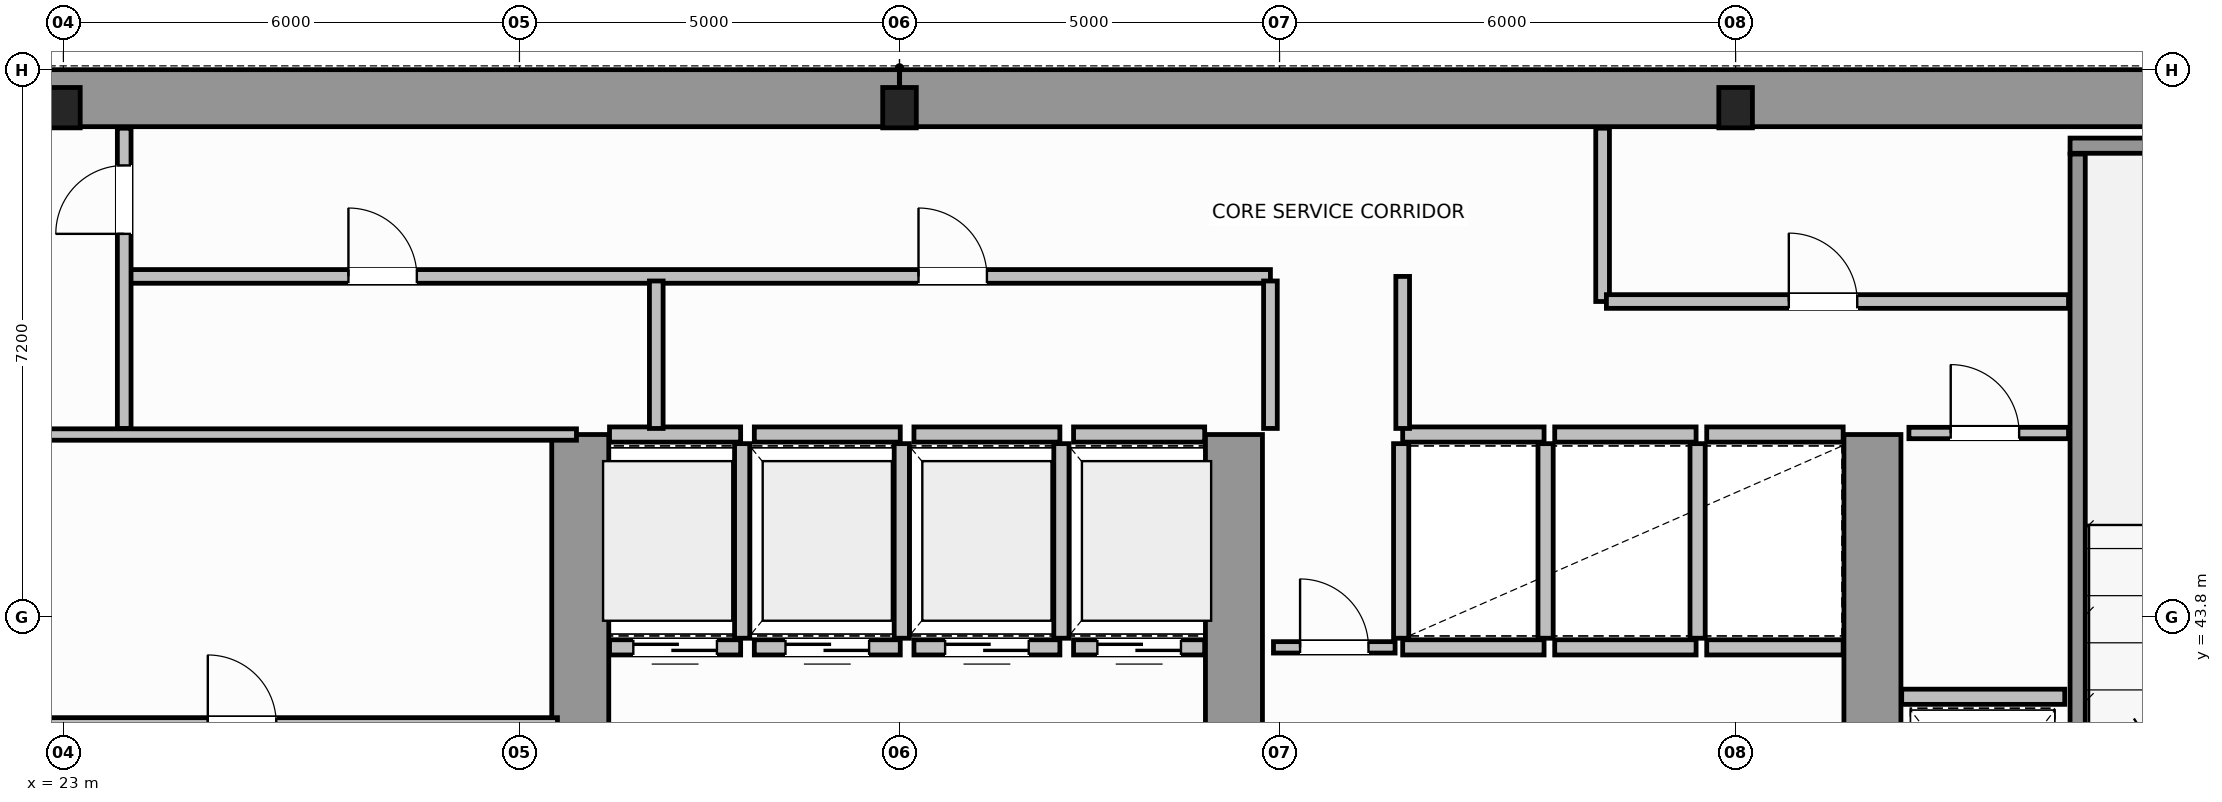
"""IFC4 building model, lengths in metres.
Left out: names, types, materials, properties, quantities, classifications, styles, units other than length and angle.
Written with IfcOpenShell. Run it as: python <this file> out.ifc"""

import sys

from ifc_helpers import new_model, si_unit, direction, frame, frame_2d, origin, origin_2d, place, context, subcontext, project, spatial, rectangle, i_section, extrude, source, transform, mapped, element, fill, save


model = new_model("IFC4")
c1 = context("Model", 3, precision=1e-05, world=origin(), true_north=direction((0.0, 1.0)))
c2 = subcontext(c1, "Body", "Model", "MODEL_VIEW")
j1 = project(units=[si_unit("LENGTHUNIT", "METRE"), si_unit("PLANEANGLEUNIT", "RADIAN")], contexts=[c1])
p1 = place(None, origin())
s1 = spatial("IfcSite", under=j1, at=p1, CompositionType="ELEMENT")
p2 = place(p1, origin())
s2 = spatial("IfcBuilding", under=s1, at=p2, CompositionType="ELEMENT")
p3 = place(p2, frame((0.0, 0.0, 137.6)))
s3 = spatial("IfcBuildingStorey", under=s2, at=p3, CompositionType="ELEMENT", Elevation=137.6)
m1 = source(origin(), c2, "Body", "SweptSolid", [
    extrude(i_section(OverallWidth=0.442, OverallDepth=0.531, WebThickness=0.065, FlangeThickness=0.076, FilletRadius=0.015, at=origin_2d()), origin(), (0.0, 0.0, 1.0), 3.8),
])
for number, where, z_axis, x_axis in (
    (1, (23.0, 50.5, 0.0), (0.0, 0.0, 1.0), (1.0, 0.0, 0.0)),
    (2, (34.0, 50.5, 0.0), (0.0, 0.0, 1.0), (1.0, 0.0, 0.0)),
    (3, (45.0, 50.5, 0.0), (0.0, 0.0, 1.0), (1.0, 0.0, 0.0)),
):
    element("IfcColumn", number, at=place(p3, frame(where, z_axis=z_axis, x_axis=x_axis)), inside=s3, PredefinedType="COLUMN", context=c2, shape_type="MappedRepresentation", body=[
        mapped(m1, transform((0.0, 0.0, 0.0), scale=1.0)),
    ])
for number, where, z_axis, x_axis in (
    (4, (14.379, 50.625, 0.0), (0.0, 0.0, 1.0), (1.0, 0.0, 0.0)),
    (5, (34.002, 50.625, 0.0), (0.0, 0.0, 1.0), (1.0, 0.0, 0.0)),
):
    element("IfcWall", number, at=place(p3, frame(where, z_axis=z_axis, x_axis=x_axis)), inside=s3, PredefinedType="SHEAR", context=c2, shape_type="SweptSolid", body=[
        extrude(rectangle(XDim=19.619, YDim=0.75, at=frame_2d((9.81, 0.0))), origin(), (0.0, 0.0, 1.0), 3.8),
    ])
for number, where, z_axis, x_axis in (
    (6, (29.8, 36.895, 0.0), (0.0, 0.0, 1.0), (0.0, 1.0, 0.0)),
    (7, (38.4, 36.895, 0.0), (0.0, 0.0, 1.0), (0.0, 1.0, 0.0)),
    (8, (46.8, 36.895, 0.0), (0.0, 0.0, 1.0), (0.0, 1.0, 0.0)),
):
    element("IfcWall", number, at=place(p3, frame(where, z_axis=z_axis, x_axis=x_axis)), inside=s3, PredefinedType="SHEAR", context=c2, shape_type="SweptSolid", body=[
        extrude(rectangle(XDim=9.305, YDim=0.75, at=frame_2d((4.652, 0.0))), origin(), (0.0, 0.0, 1.0), 3.8),
    ])
p4 = place(p3, frame((49.4, 50.0, 0.0), z_axis=(0.0, 0.0, 1.0), x_axis=(1.0, 0.0, 0.0)))
e9 = element("IfcWall", 9, at=p4, inside=s3, PredefinedType="SOLIDWALL", context=c2, shape_type="SweptSolid", body=[
    extrude(rectangle(XDim=4.225, YDim=0.2, at=frame_2d((2.113, 0.0))), origin(), (0.0, 0.0, 1.0), 3.8),
])
p5 = place(p3, frame((49.5, 39.96, 0.0), z_axis=(0.0, 0.0, 1.0), x_axis=(0.0, 1.0, 0.0)))
e10 = element("IfcWall", 10, at=p5, inside=s3, PredefinedType="SOLIDWALL", context=c2, shape_type="SweptSolid", body=[
    extrude(rectangle(XDim=9.93, YDim=0.2, at=frame_2d((4.965, 0.0))), origin(), (0.0, 0.0, 1.0), 3.8),
])
p6 = place(p3, frame((30.185, 43.4, 0.0), z_axis=(0.0, 0.0, 1.0), x_axis=(1.0, 0.0, 0.0)))
e11 = element("IfcWall", 11, at=p6, inside=s3, PredefinedType="SOLIDWALL", context=c2, shape_type="SweptSolid", body=[
    extrude(rectangle(XDim=1.725, YDim=0.2, at=frame_2d((0.862, 0.0))), origin(), (0.0, 0.0, 1.0), 3.58),
])
p7 = place(p6, frame((0.313, 0.0, 0.0)))
e12 = element("IfcOpeningElement", 12, at=p7, cuts=e11, PredefinedType="OPENING", context=c2, shape_type="SweptSolid", body=[
    extrude(rectangle(XDim=1.1, YDim=2.15, at=frame_2d((0.55, 1.075))), frame((0.0, 0.11, 0.0), z_axis=(0.0, -1.0, 0.0), x_axis=(1.0, 0.0, 0.0)), (0.0, 0.0, 1.0), 0.22),
])
p8 = place(p3, frame((30.185, 46.2, 0.0), z_axis=(0.0, 0.0, 1.0), x_axis=(1.0, 0.0, 0.0)))
e13 = element("IfcWall", 13, at=p8, inside=s3, PredefinedType="SOLIDWALL", context=c2, shape_type="SweptSolid", body=[
    extrude(rectangle(XDim=1.725, YDim=0.2, at=frame_2d((0.862, 0.0))), origin(), (0.0, 0.0, 1.0), 3.58),
])
p9 = place(p3, frame((31.93, 43.52, 0.0), z_axis=(0.0, 0.0, 1.0), x_axis=(0.0, 1.0, 0.0)))
e14 = element("IfcWall", 14, at=p9, inside=s3, PredefinedType="SOLIDWALL", context=c2, shape_type="SweptSolid", body=[
    extrude(rectangle(XDim=2.56, YDim=0.2, at=frame_2d((1.28, 0.0))), origin(), (0.0, 0.0, 1.0), 3.58),
])
p10 = place(p3, frame((32.09, 43.4, 0.0), z_axis=(0.0, 0.0, 1.0), x_axis=(1.0, 0.0, 0.0)))
e15 = element("IfcWall", 15, at=p10, inside=s3, PredefinedType="SOLIDWALL", context=c2, shape_type="SweptSolid", body=[
    extrude(rectangle(XDim=1.92, YDim=0.2, at=frame_2d((0.96, 0.0))), origin(), (0.0, 0.0, 1.0), 3.58),
])
p11 = place(p10, frame((0.41, 0.0, 0.0)))
e16 = element("IfcOpeningElement", 16, at=p11, cuts=e15, PredefinedType="OPENING", context=c2, shape_type="SweptSolid", body=[
    extrude(rectangle(XDim=1.1, YDim=2.15, at=frame_2d((0.55, 1.075))), frame((0.0, 0.11, 0.0), z_axis=(0.0, -1.0, 0.0), x_axis=(1.0, 0.0, 0.0)), (0.0, 0.0, 1.0), 0.22),
])
p12 = place(p3, frame((32.09, 46.2, 0.0), z_axis=(0.0, 0.0, 1.0), x_axis=(1.0, 0.0, 0.0)))
e17 = element("IfcWall", 17, at=p12, inside=s3, PredefinedType="SOLIDWALL", context=c2, shape_type="SweptSolid", body=[
    extrude(rectangle(XDim=1.92, YDim=0.2, at=frame_2d((0.96, 0.0))), origin(), (0.0, 0.0, 1.0), 3.58),
])
p13 = place(p3, frame((34.03, 43.52, 0.0), z_axis=(0.0, 0.0, 1.0), x_axis=(0.0, 1.0, 0.0)))
e18 = element("IfcWall", 18, at=p13, inside=s3, PredefinedType="SOLIDWALL", context=c2, shape_type="SweptSolid", body=[
    extrude(rectangle(XDim=2.56, YDim=0.2, at=frame_2d((1.28, 0.0))), origin(), (0.0, 0.0, 1.0), 3.58),
])
p14 = place(p3, frame((34.19, 43.4, 0.0), z_axis=(0.0, 0.0, 1.0), x_axis=(1.0, 0.0, 0.0)))
e19 = element("IfcWall", 19, at=p14, inside=s3, PredefinedType="SOLIDWALL", context=c2, shape_type="SweptSolid", body=[
    extrude(rectangle(XDim=1.92, YDim=0.2, at=frame_2d((0.96, 0.0))), origin(), (0.0, 0.0, 1.0), 3.58),
])
p15 = place(p14, frame((0.41, 0.0, 0.0)))
e20 = element("IfcOpeningElement", 20, at=p15, cuts=e19, PredefinedType="OPENING", context=c2, shape_type="SweptSolid", body=[
    extrude(rectangle(XDim=1.1, YDim=2.15, at=frame_2d((0.55, 1.075))), frame((0.0, 0.11, 0.0), z_axis=(0.0, -1.0, 0.0), x_axis=(1.0, 0.0, 0.0)), (0.0, 0.0, 1.0), 0.22),
])
p16 = place(p3, frame((34.19, 46.2, 0.0), z_axis=(0.0, 0.0, 1.0), x_axis=(1.0, 0.0, 0.0)))
e21 = element("IfcWall", 21, at=p16, inside=s3, PredefinedType="SOLIDWALL", context=c2, shape_type="SweptSolid", body=[
    extrude(rectangle(XDim=1.92, YDim=0.2, at=frame_2d((0.96, 0.0))), origin(), (0.0, 0.0, 1.0), 3.58),
])
p17 = place(p3, frame((36.13, 43.52, 0.0), z_axis=(0.0, 0.0, 1.0), x_axis=(0.0, 1.0, 0.0)))
e22 = element("IfcWall", 22, at=p17, inside=s3, PredefinedType="SOLIDWALL", context=c2, shape_type="SweptSolid", body=[
    extrude(rectangle(XDim=2.56, YDim=0.2, at=frame_2d((1.28, 0.0))), origin(), (0.0, 0.0, 1.0), 3.58),
])
p18 = place(p3, frame((36.29, 43.4, 0.0), z_axis=(0.0, 0.0, 1.0), x_axis=(1.0, 0.0, 0.0)))
e23 = element("IfcWall", 23, at=p18, inside=s3, PredefinedType="SOLIDWALL", context=c2, shape_type="SweptSolid", body=[
    extrude(rectangle(XDim=1.725, YDim=0.2, at=frame_2d((0.862, 0.0))), origin(), (0.0, 0.0, 1.0), 3.58),
])
p19 = place(p18, frame((0.313, 0.0, 0.0)))
e24 = element("IfcOpeningElement", 24, at=p19, cuts=e23, PredefinedType="OPENING", context=c2, shape_type="SweptSolid", body=[
    extrude(rectangle(XDim=1.1, YDim=2.15, at=frame_2d((0.55, 1.075))), frame((0.0, 0.11, 0.0), z_axis=(0.0, -1.0, 0.0), x_axis=(1.0, 0.0, 0.0)), (0.0, 0.0, 1.0), 0.22),
])
p20 = place(p3, frame((36.29, 46.2, 0.0), z_axis=(0.0, 0.0, 1.0), x_axis=(1.0, 0.0, 0.0)))
e25 = element("IfcWall", 25, at=p20, inside=s3, PredefinedType="SOLIDWALL", context=c2, shape_type="SweptSolid", body=[
    extrude(rectangle(XDim=1.725, YDim=0.2, at=frame_2d((0.862, 0.0))), origin(), (0.0, 0.0, 1.0), 3.58),
])
for number, where, z_axis, x_axis in (
    (26, (40.62, 43.4, 0.0), (0.0, 0.0, 1.0), (1.0, 0.0, 0.0)),
    (27, (40.62, 46.2, 0.0), (0.0, 0.0, 1.0), (1.0, 0.0, 0.0)),
):
    element("IfcWall", number, at=place(p3, frame(where, z_axis=z_axis, x_axis=x_axis)), inside=s3, PredefinedType="SOLIDWALL", context=c2, shape_type="SweptSolid", body=[
        extrude(rectangle(XDim=1.86, YDim=0.2, at=frame_2d((0.93, 0.0))), origin(), (0.0, 0.0, 1.0), 3.58),
    ])
for number, where, z_axis, x_axis in (
    (28, (40.6, 43.52, 0.0), (0.0, 0.0, 1.0), (0.0, 1.0, 0.0)),
    (29, (42.5, 43.52, 0.0), (0.0, 0.0, 1.0), (0.0, 1.0, 0.0)),
):
    element("IfcWall", number, at=place(p3, frame(where, z_axis=z_axis, x_axis=x_axis)), inside=s3, PredefinedType="SOLIDWALL", context=c2, shape_type="SweptSolid", body=[
        extrude(rectangle(XDim=2.56, YDim=0.2, at=frame_2d((1.28, 0.0))), origin(), (0.0, 0.0, 1.0), 3.58),
    ])
for number, where, z_axis, x_axis in (
    (30, (42.62, 43.4, 0.0), (0.0, 0.0, 1.0), (1.0, 0.0, 0.0)),
    (31, (42.62, 46.2, 0.0), (0.0, 0.0, 1.0), (1.0, 0.0, 0.0)),
):
    element("IfcWall", number, at=place(p3, frame(where, z_axis=z_axis, x_axis=x_axis)), inside=s3, PredefinedType="SOLIDWALL", context=c2, shape_type="SweptSolid", body=[
        extrude(rectangle(XDim=1.86, YDim=0.2, at=frame_2d((0.93, 0.0))), origin(), (0.0, 0.0, 1.0), 3.58),
    ])
p21 = place(p3, frame((44.5, 43.52, 0.0), z_axis=(0.0, 0.0, 1.0), x_axis=(0.0, 1.0, 0.0)))
e32 = element("IfcWall", 32, at=p21, inside=s3, PredefinedType="SOLIDWALL", context=c2, shape_type="SweptSolid", body=[
    extrude(rectangle(XDim=2.56, YDim=0.2, at=frame_2d((1.28, 0.0))), origin(), (0.0, 0.0, 1.0), 3.58),
])
for number, where, z_axis, x_axis in (
    (33, (44.62, 43.4, 0.0), (0.0, 0.0, 1.0), (1.0, 0.0, 0.0)),
    (34, (44.62, 46.2, 0.0), (0.0, 0.0, 1.0), (1.0, 0.0, 0.0)),
):
    element("IfcWall", number, at=place(p3, frame(where, z_axis=z_axis, x_axis=x_axis)), inside=s3, PredefinedType="SOLIDWALL", context=c2, shape_type="SweptSolid", body=[
        extrude(rectangle(XDim=1.795, YDim=0.2, at=frame_2d((0.897, 0.0))), origin(), (0.0, 0.0, 1.0), 3.58),
    ])
p22 = place(p3, frame((47.185, 42.75, 0.0), z_axis=(0.0, 0.0, 1.0), x_axis=(1.0, 0.0, 0.0)))
e35 = element("IfcWall", 35, at=p22, inside=s3, PredefinedType="SOLIDWALL", context=c2, shape_type="SweptSolid", body=[
    extrude(rectangle(XDim=2.145, YDim=0.2, at=frame_2d((1.073, 0.0))), origin(), (0.0, 0.0, 1.0), 3.58),
])
p23 = place(p3, frame((21.25, 46.2, 0.0), z_axis=(0.0, 0.0, 1.0), x_axis=(1.0, 0.0, 0.0)))
e36 = element("IfcWall", 36, at=p23, inside=s3, PredefinedType="PARTITIONING", context=c2, shape_type="SweptSolid", body=[
    extrude(rectangle(XDim=8.5, YDim=0.15, at=frame_2d((4.25, 0.0))), origin(), (0.0, 0.0, 1.0), 3.58),
])
p24 = place(p3, frame((21.5, 42.4, 0.0), z_axis=(0.0, 0.0, 1.0), x_axis=(1.0, 0.0, 0.0)))
e37 = element("IfcWall", 37, at=p24, inside=s3, PredefinedType="PARTITIONING", context=c2, shape_type="SweptSolid", body=[
    extrude(rectangle(XDim=8.0, YDim=0.15, at=frame_2d((4.0, 0.0))), origin(), (0.0, 0.0, 1.0), 3.58),
])
p25 = place(p24, frame((3.4, 0.0, 0.0)))
e38 = element("IfcOpeningElement", 38, at=p25, cuts=e37, PredefinedType="OPENING", context=c2, shape_type="SweptSolid", body=[
    extrude(rectangle(XDim=0.9, YDim=2.1, at=frame_2d((0.45, 1.05))), frame((0.0, 0.085, 0.0), z_axis=(0.0, -1.0, 0.0), x_axis=(1.0, 0.0, 0.0)), (0.0, 0.0, 1.0), 0.17),
])
p26 = place(p3, frame((47.28, 46.22, 0.0), z_axis=(0.0, 0.0, 1.0), x_axis=(1.0, 0.0, 0.0)))
e39 = element("IfcWall", 39, at=p26, inside=s3, PredefinedType="PARTITIONING", context=c2, shape_type="SweptSolid", body=[
    extrude(rectangle(XDim=2.1, YDim=0.15, at=frame_2d((1.05, 0.0))), origin(), (0.0, 0.0, 1.0), 3.58),
])
p27 = place(p26, frame((0.55, 0.0, 0.0)))
e40 = element("IfcOpeningElement", 40, at=p27, cuts=e39, PredefinedType="OPENING", context=c2, shape_type="SweptSolid", body=[
    extrude(rectangle(XDim=0.9, YDim=2.1, at=frame_2d((0.45, 1.05))), frame((0.0, 0.085, 0.0), z_axis=(0.0, -1.0, 0.0), x_axis=(1.0, 0.0, 0.0)), (0.0, 0.0, 1.0), 0.17),
])
p28 = place(p3, frame((38.92, 43.4, 0.0), z_axis=(0.0, 0.0, 1.0), x_axis=(1.0, 0.0, 0.0)))
e41 = element("IfcWall", 41, at=p28, inside=s3, PredefinedType="PARTITIONING", context=c2, shape_type="SweptSolid", body=[
    extrude(rectangle(XDim=1.6, YDim=0.15, at=frame_2d((0.8, 0.0))), origin(), (0.0, 0.0, 1.0), 3.58),
])
p29 = place(p28, frame((0.35, 0.0, 0.0)))
e42 = element("IfcOpeningElement", 42, at=p29, cuts=e41, PredefinedType="OPENING", context=c2, shape_type="SweptSolid", body=[
    extrude(rectangle(XDim=0.9, YDim=2.1, at=frame_2d((0.45, 1.05))), frame((0.0, 0.085, 0.0), z_axis=(0.0, -1.0, 0.0), x_axis=(1.0, 0.0, 0.0)), (0.0, 0.0, 1.0), 0.17),
])
p30 = place(p3, frame((23.85, 48.28, 0.0), z_axis=(0.0, 0.0, 1.0), x_axis=(1.0, 0.0, 0.0)))
e43 = element("IfcWall", 43, at=p30, inside=s3, PredefinedType="PLUMBINGWALL", context=c2, shape_type="SweptSolid", body=[
    extrude(rectangle(XDim=15.03, YDim=0.18, at=frame_2d((7.515, 0.0))), origin(), (0.0, 0.0, 1.0), 3.58),
])
p31 = place(p30, frame((2.9, 0.0, 0.0)))
e44 = element("IfcOpeningElement", 44, at=p31, cuts=e43, PredefinedType="OPENING", context=c2, shape_type="SweptSolid", body=[
    extrude(rectangle(XDim=0.9, YDim=2.15, at=frame_2d((0.45, 1.075))), frame((0.0, 0.1, 0.0), z_axis=(0.0, -1.0, 0.0), x_axis=(1.0, 0.0, 0.0)), (0.0, 0.0, 1.0), 0.2),
])
p32 = place(p30, frame((10.4, 0.0, 0.0)))
e45 = element("IfcOpeningElement", 45, at=p32, cuts=e43, PredefinedType="OPENING", context=c2, shape_type="SweptSolid", body=[
    extrude(rectangle(XDim=0.9, YDim=2.15, at=frame_2d((0.45, 1.075))), frame((0.0, 0.1, 0.0), z_axis=(0.0, -1.0, 0.0), x_axis=(1.0, 0.0, 0.0)), (0.0, 0.0, 1.0), 0.2),
])
p33 = place(p3, frame((23.8, 46.28, 0.0), z_axis=(0.0, 0.0, 1.0), x_axis=(0.0, 1.0, 0.0)))
e46 = element("IfcWall", 46, at=p33, inside=s3, PredefinedType="PLUMBINGWALL", context=c2, shape_type="SweptSolid", body=[
    extrude(rectangle(XDim=3.95, YDim=0.18, at=frame_2d((1.975, 0.0))), origin(), (0.0, 0.0, 1.0), 3.58),
])
p34 = place(p33, frame((2.56, 0.0, 0.0)))
e47 = element("IfcOpeningElement", 47, at=p34, cuts=e46, PredefinedType="OPENING", context=c2, shape_type="SweptSolid", body=[
    extrude(rectangle(XDim=0.9, YDim=2.15, at=frame_2d((0.45, 1.075))), frame((0.0, 0.1, 0.0), z_axis=(0.0, -1.0, 0.0), x_axis=(1.0, 0.0, 0.0)), (0.0, 0.0, 1.0), 0.2),
])
for number, where, z_axis, x_axis in (
    (48, (30.8, 46.28, 0.0), (0.0, 0.0, 1.0), (0.0, 1.0, 0.0)),
    (49, (38.88, 46.28, 0.0), (0.0, 0.0, 1.0), (0.0, 1.0, 0.0)),
):
    element("IfcWall", number, at=place(p3, frame(where, z_axis=z_axis, x_axis=x_axis)), inside=s3, PredefinedType="PLUMBINGWALL", context=c2, shape_type="SweptSolid", body=[
        extrude(rectangle(XDim=1.94, YDim=0.18, at=frame_2d((0.97, 0.0))), origin(), (0.0, 0.0, 1.0), 3.58),
    ])
p35 = place(p3, frame((40.62, 46.28, 0.0), z_axis=(0.0, 0.0, 1.0), x_axis=(0.0, 1.0, 0.0)))
e50 = element("IfcWall", 50, at=p35, inside=s3, PredefinedType="PLUMBINGWALL", context=c2, shape_type="SweptSolid", body=[
    extrude(rectangle(XDim=2.0, YDim=0.18, at=frame_2d((1.0, 0.0))), origin(), (0.0, 0.0, 1.0), 3.58),
])
p36 = place(p3, frame((43.25, 47.95, 0.0), z_axis=(0.0, 0.0, 1.0), x_axis=(0.0, 1.0, 0.0)))
e51 = element("IfcWall", 51, at=p36, inside=s3, PredefinedType="PLUMBINGWALL", context=c2, shape_type="SweptSolid", body=[
    extrude(rectangle(XDim=2.28, YDim=0.18, at=frame_2d((1.14, 0.0))), origin(), (0.0, 0.0, 1.0), 3.58),
])
p37 = place(p3, frame((43.3, 47.95, 0.0), z_axis=(0.0, 0.0, 1.0), x_axis=(1.0, 0.0, 0.0)))
e52 = element("IfcWall", 52, at=p37, inside=s3, PredefinedType="PLUMBINGWALL", context=c2, shape_type="SweptSolid", body=[
    extrude(rectangle(XDim=6.08, YDim=0.18, at=frame_2d((3.04, 0.0))), origin(), (0.0, 0.0, 1.0), 3.58),
])
p38 = place(p37, frame((2.4, 0.0, 0.0)))
e53 = element("IfcOpeningElement", 53, at=p38, cuts=e52, PredefinedType="OPENING", context=c2, shape_type="SweptSolid", body=[
    extrude(rectangle(XDim=0.9, YDim=2.15, at=frame_2d((0.45, 1.075))), frame((0.0, 0.1, 0.0), z_axis=(0.0, -1.0, 0.0), x_axis=(1.0, 0.0, 0.0)), (0.0, 0.0, 1.0), 0.2),
])
m2 = source(origin(), c2, "Body", "SweptSolid", [
    extrude(rectangle(XDim=1.1, YDim=2.15, at=frame_2d((0.55, 1.075))), frame((0.0, 0.025, 0.0), z_axis=(0.0, -1.0, 0.0), x_axis=(1.0, 0.0, 0.0)), (0.0, 0.0, 1.0), 0.05),
])
p39 = place(p7, origin())
e54 = element("IfcDoor", 54, at=p39, inside=s3, OperationType="DOUBLE_DOOR_SLIDING", PredefinedType="DOOR", context=c2, shape_type="MappedRepresentation", body=[
    mapped(m2, transform((0.0, 0.0, 0.0), scale=1.0)),
])
fill(e12, e54)
p40 = place(p11, origin())
e55 = element("IfcDoor", 55, at=p40, inside=s3, OperationType="DOUBLE_DOOR_SLIDING", PredefinedType="DOOR", context=c2, shape_type="MappedRepresentation", body=[
    mapped(m2, transform((0.0, 0.0, 0.0), scale=1.0)),
])
fill(e16, e55)
p41 = place(p15, origin())
e56 = element("IfcDoor", 56, at=p41, inside=s3, OperationType="DOUBLE_DOOR_SLIDING", PredefinedType="DOOR", context=c2, shape_type="MappedRepresentation", body=[
    mapped(m2, transform((0.0, 0.0, 0.0), scale=1.0)),
])
fill(e20, e56)
p42 = place(p19, origin())
e57 = element("IfcDoor", 57, at=p42, inside=s3, OperationType="DOUBLE_DOOR_SLIDING", PredefinedType="DOOR", context=c2, shape_type="MappedRepresentation", body=[
    mapped(m2, transform((0.0, 0.0, 0.0), scale=1.0)),
])
fill(e24, e57)
m3 = source(origin(), c2, "Body", "SweptSolid", [
    extrude(rectangle(XDim=0.9, YDim=2.1, at=frame_2d((0.45, 1.05))), frame((0.0, 0.025, 0.0), z_axis=(0.0, -1.0, 0.0), x_axis=(1.0, 0.0, 0.0)), (0.0, 0.0, 1.0), 0.05),
])
p43 = place(p25, origin())
e58 = element("IfcDoor", 58, at=p43, inside=s3, OperationType="SINGLE_SWING_RIGHT", PredefinedType="DOOR", context=c2, shape_type="MappedRepresentation", body=[
    mapped(m3, transform((0.0, 0.0, 0.0), scale=1.0)),
])
fill(e38, e58)
p44 = place(p27, origin())
e59 = element("IfcDoor", 59, at=p44, inside=s3, OperationType="SINGLE_SWING_RIGHT", PredefinedType="DOOR", context=c2, shape_type="MappedRepresentation", body=[
    mapped(m3, transform((0.0, 0.0, 0.0), scale=1.0)),
])
fill(e40, e59)
p45 = place(p29, origin())
e60 = element("IfcDoor", 60, at=p45, inside=s3, OperationType="SINGLE_SWING_LEFT", PredefinedType="DOOR", context=c2, shape_type="MappedRepresentation", body=[
    mapped(m3, transform((0.0, 0.0, 0.0), scale=1.0)),
])
fill(e42, e60)
m4 = source(origin(), c2, "Body", "SweptSolid", [
    extrude(rectangle(XDim=0.9, YDim=2.15, at=frame_2d((0.45, 1.075))), frame((0.0, 0.025, 0.0), z_axis=(0.0, -1.0, 0.0), x_axis=(1.0, 0.0, 0.0)), (0.0, 0.0, 1.0), 0.05),
])
p46 = place(p34, origin())
e61 = element("IfcDoor", 61, at=p46, inside=s3, OperationType="SINGLE_SWING_LEFT", PredefinedType="DOOR", context=c2, shape_type="MappedRepresentation", body=[
    mapped(m4, transform((0.0, 0.0, 0.0), scale=1.0)),
])
fill(e47, e61)
p47 = place(p31, origin())
e62 = element("IfcDoor", 62, at=p47, inside=s3, OperationType="SINGLE_SWING_RIGHT", PredefinedType="DOOR", context=c2, shape_type="MappedRepresentation", body=[
    mapped(m4, transform((0.0, 0.0, 0.0), scale=1.0)),
])
fill(e44, e62)
p48 = place(p32, origin())
e63 = element("IfcDoor", 63, at=p48, inside=s3, OperationType="SINGLE_SWING_LEFT", PredefinedType="DOOR", context=c2, shape_type="MappedRepresentation", body=[
    mapped(m4, transform((0.0, 0.0, 0.0), scale=1.0)),
])
fill(e45, e63)
p49 = place(p38, origin())
e64 = element("IfcDoor", 64, at=p49, inside=s3, OperationType="SINGLE_SWING_RIGHT", PredefinedType="DOOR", context=c2, shape_type="MappedRepresentation", body=[
    mapped(m4, transform((0.0, 0.0, 0.0), scale=1.0)),
])
fill(e53, e64)
save(model, sys.argv[1])
